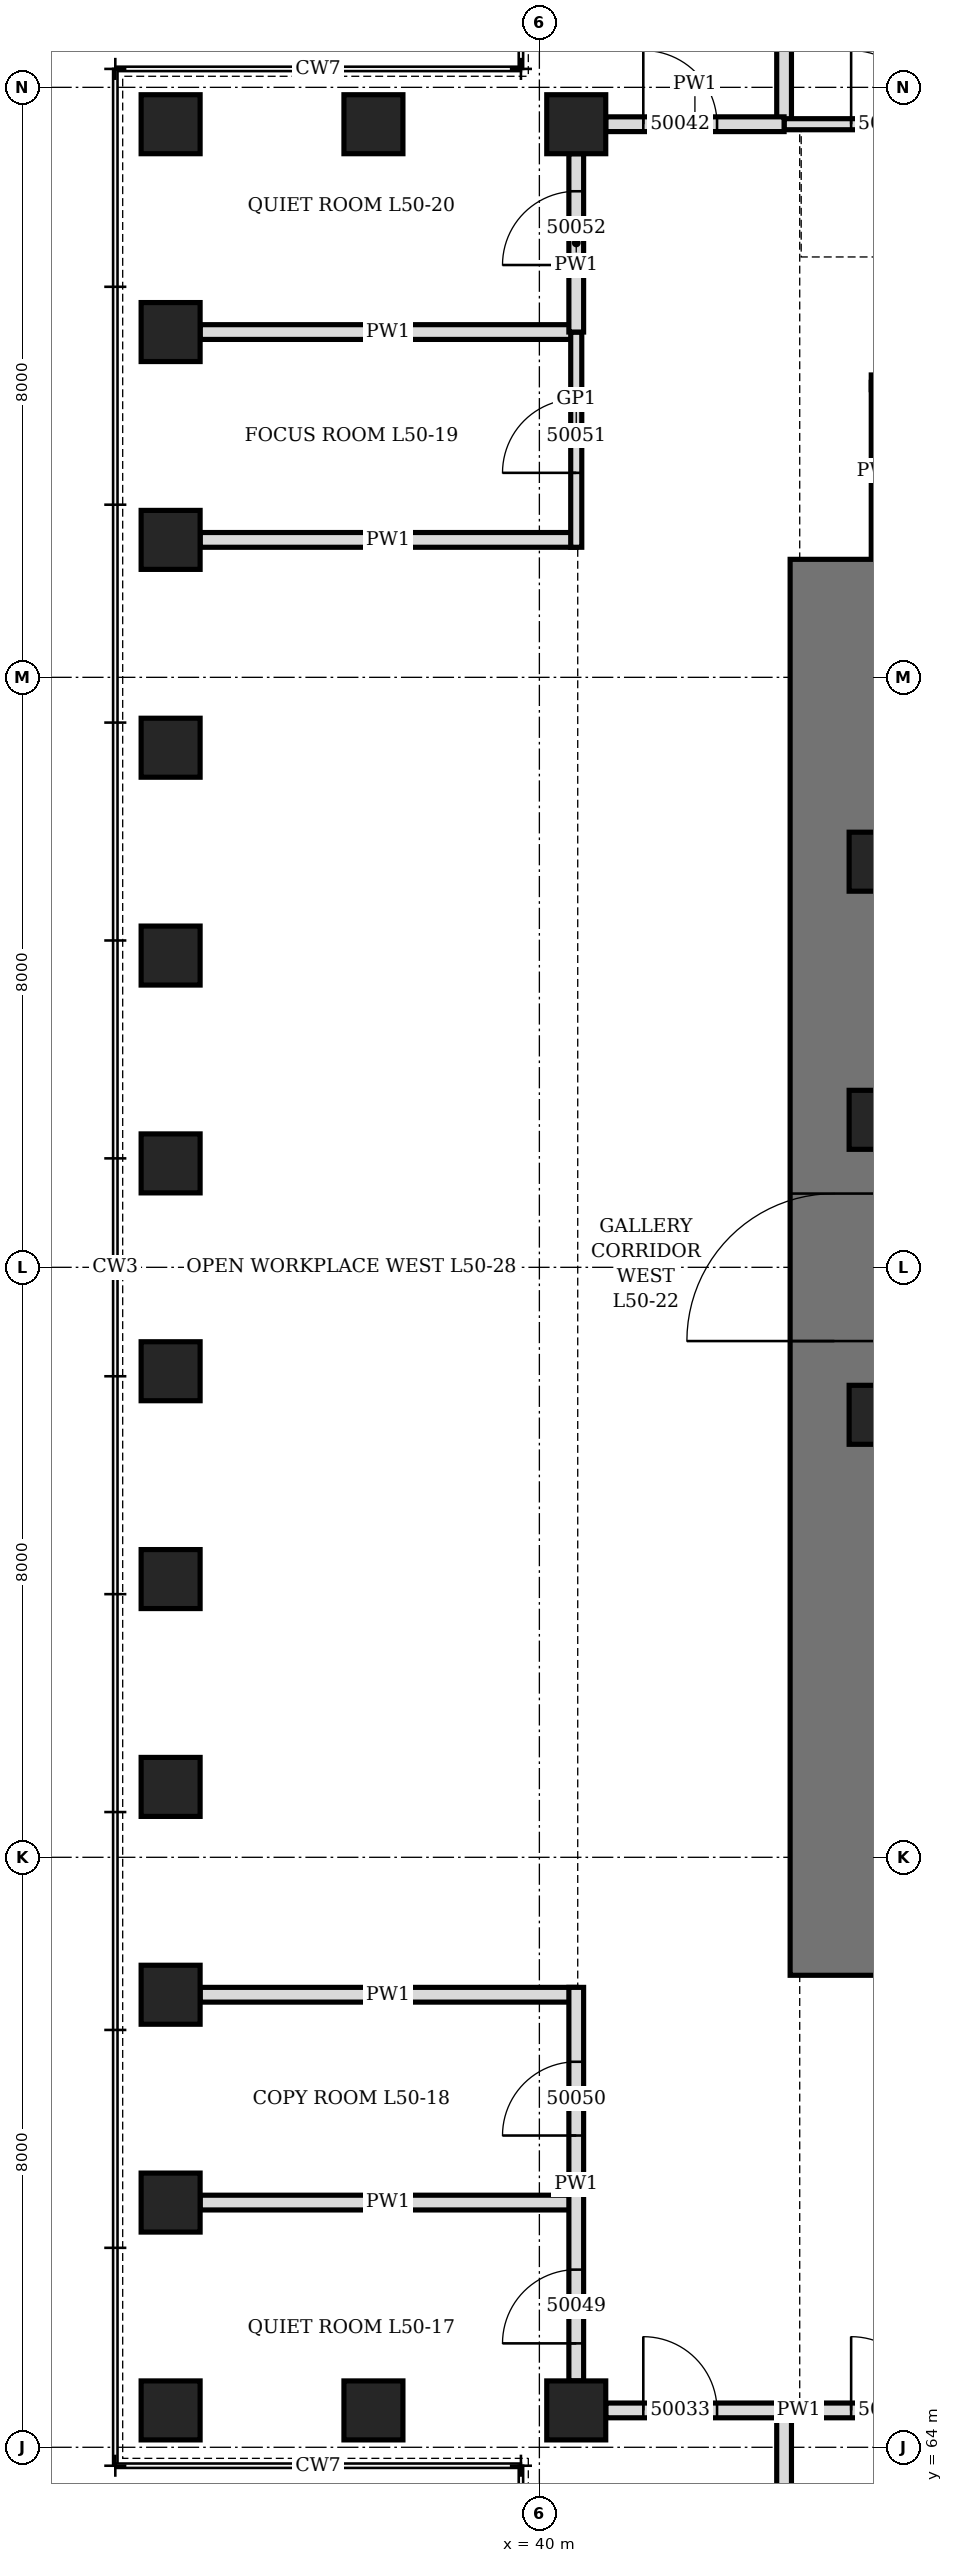
"""IFC4 building model, lengths in metres.
Left out: names, types, materials, properties, quantities, classifications, styles, units other than length and angle.
Written with IfcOpenShell. Run it as: python <this file> out.ifc"""

import sys

from ifc_helpers import new_model, si_unit, direction, frame, frame_2d, origin, origin_2d, place, context, subcontext, project, spatial, rectangle, hollow_rectangle, extrude, element, fill, save


model = new_model("IFC4")
c1 = context("Model", 3, precision=1e-05, world=origin(), true_north=direction((0.0, 1.0)))
c2 = subcontext(c1, "Body", "Model", "MODEL_VIEW")
j1 = project(units=[si_unit("LENGTHUNIT", "METRE"), si_unit("PLANEANGLEUNIT", "RADIAN")], contexts=[c1])
p1 = place(None, origin())
s1 = spatial("IfcSite", under=j1, at=p1, CompositionType="ELEMENT")
p2 = place(p1, origin())
s2 = spatial("IfcBuilding", under=s1, at=p2, CompositionType="ELEMENT")
p3 = place(p2, frame((0.0, 0.0, 223.3)))
s3 = spatial("IfcBuildingStorey", under=s2, at=p3, CompositionType="ELEMENT", Elevation=223.3)
for number, where, z_axis, x_axis in (
    (1, (40.5, 95.5, 0.0), (0.0, 0.0, 1.0), (1.0, 0.0, 0.0)),
    (2, (37.75, 95.5, 0.0), (0.0, 0.0, 1.0), (1.0, 0.0, 0.0)),
    (3, (35.0, 95.5, 0.0), (0.0, 0.0, 1.0), (0.0, 1.0, 0.0)),
    (4, (35.0, 92.682, 0.0), (0.0, 0.0, 1.0), (0.0, 1.0, 0.0)),
    (5, (35.0, 89.864, 0.0), (0.0, 0.0, 1.0), (0.0, 1.0, 0.0)),
    (6, (35.0, 87.045, 0.0), (0.0, 0.0, 1.0), (0.0, 1.0, 0.0)),
    (7, (35.0, 84.227, 0.0), (0.0, 0.0, 1.0), (0.0, 1.0, 0.0)),
    (8, (35.0, 81.409, 0.0), (0.0, 0.0, 1.0), (0.0, 1.0, 0.0)),
    (9, (35.0, 78.591, 0.0), (0.0, 0.0, 1.0), (0.0, 1.0, 0.0)),
    (10, (35.0, 75.773, 0.0), (0.0, 0.0, 1.0), (0.0, 1.0, 0.0)),
    (11, (35.0, 72.955, 0.0), (0.0, 0.0, 1.0), (0.0, 1.0, 0.0)),
    (12, (35.0, 70.136, 0.0), (0.0, 0.0, 1.0), (0.0, 1.0, 0.0)),
    (13, (35.0, 67.318, 0.0), (0.0, 0.0, 1.0), (0.0, 1.0, 0.0)),
    (14, (35.0, 64.5, 0.0), (0.0, 0.0, 1.0), (1.0, 0.0, 0.0)),
    (15, (37.75, 64.5, 0.0), (0.0, 0.0, 1.0), (1.0, 0.0, 0.0)),
    (16, (40.5, 64.5, 0.0), (0.0, 0.0, 1.0), (0.0, 1.0, 0.0)),
):
    element("IfcColumn", number, at=place(p3, frame(where, z_axis=z_axis, x_axis=x_axis)), inside=s3, PredefinedType="COLUMN", context=c2, shape_type="SweptSolid", body=[
        extrude(hollow_rectangle(XDim=0.8, YDim=0.8, WallThickness=0.08, at=origin_2d()), origin(), (0.0, 0.0, 1.0), 4.2),
    ])
p4 = place(p3, frame((44.0, 70.4, 0.0), z_axis=(0.0, 0.0, 1.0), x_axis=(0.0, 1.0, 0.0)))
e17 = element("IfcWall", 17, at=p4, inside=s3, PredefinedType="SHEAR", context=c2, shape_type="SweptSolid", body=[
    extrude(rectangle(XDim=19.2, YDim=1.2, at=frame_2d((9.6, 0.0))), origin(), (0.0, 0.0, 1.0), 4.2),
])
p5 = place(p4, frame((8.6, 0.0, 0.0)))
e18 = element("IfcOpeningElement", 18, at=p5, cuts=e17, PredefinedType="OPENING", context=c2, shape_type="SweptSolid", body=[
    extrude(rectangle(XDim=2.0, YDim=2.4, at=frame_2d((1.0, 1.2))), frame((0.0, 0.61, 0.0), z_axis=(0.0, -1.0, 0.0), x_axis=(1.0, 0.0, 0.0)), (0.0, 0.0, 1.0), 1.22),
])
for number, where, z_axis, x_axis in (
    (19, (44.6, 78.0, 0.0), (0.0, 0.0, 1.0), (1.0, 0.0, 0.0)),
    (20, (44.6, 82.0, 0.0), (0.0, 0.0, 1.0), (1.0, 0.0, 0.0)),
    (21, (44.6, 85.5, 0.0), (0.0, 0.0, 1.0), (1.0, 0.0, 0.0)),
):
    element("IfcColumn", number, at=place(p3, frame(where, z_axis=z_axis, x_axis=x_axis)), inside=s3, PredefinedType="COLUMN", context=c2, shape_type="SweptSolid", body=[
        extrude(hollow_rectangle(XDim=0.8, YDim=0.8, WallThickness=0.1, at=origin_2d()), origin(), (0.0, 0.0, 1.0), 4.2),
    ])
for number, where, z_axis, x_axis in (
    (22, (43.318, 59.4, 0.0), (0.0, 0.0, 1.0), (0.0, 1.0, 0.0)),
    (23, (43.318, 95.5, 0.0), (0.0, 0.0, 1.0), (0.0, 1.0, 0.0)),
    (24, (35.4, 67.318, 0.0), (0.0, 0.0, 1.0), (1.0, 0.0, 0.0)),
    (25, (35.4, 70.136, 0.0), (0.0, 0.0, 1.0), (1.0, 0.0, 0.0)),
    (26, (35.4, 89.864, 0.0), (0.0, 0.0, 1.0), (1.0, 0.0, 0.0)),
    (27, (35.4, 92.682, 0.0), (0.0, 0.0, 1.0), (1.0, 0.0, 0.0)),
):
    element("IfcWall", number, at=place(p3, frame(where, z_axis=z_axis, x_axis=x_axis)), inside=s3, PredefinedType="PARTITIONING", context=c2, shape_type="SweptSolid", body=[
        extrude(rectangle(XDim=5.1, YDim=0.2, at=frame_2d((2.55, 0.0))), origin(), (0.0, 0.0, 1.0), 3.428),
    ])
p6 = place(p3, frame((44.6, 89.6, 0.0), z_axis=(0.0, 0.0, 1.0), x_axis=(0.0, 1.0, 0.0)))
e28 = element("IfcWall", 28, at=p6, inside=s3, PredefinedType="PARTITIONING", context=c2, shape_type="SweptSolid", body=[
    extrude(rectangle(XDim=2.4, YDim=0.2, at=frame_2d((1.2, 0.0))), origin(), (0.0, 0.0, 1.0), 4.04),
])
p7 = place(p3, frame((40.9, 64.5, 0.0), z_axis=(0.0, 0.0, 1.0), x_axis=(1.0, 0.0, 0.0)))
e29 = element("IfcWall", 29, at=p7, inside=s3, PredefinedType="PARTITIONING", context=c2, shape_type="SweptSolid", body=[
    extrude(rectangle(XDim=5.237, YDim=0.2, at=frame_2d((2.618, 0.0))), origin(), (0.0, 0.0, 1.0), 4.04),
])
p8 = place(p7, frame((0.509, 0.0, 0.0)))
e30 = element("IfcOpeningElement", 30, at=p8, cuts=e29, PredefinedType="OPENING", context=c2, shape_type="SweptSolid", body=[
    extrude(rectangle(XDim=1.0, YDim=2.1, at=frame_2d((0.5, 1.05))), frame((0.0, 0.11, 0.0), z_axis=(0.0, -1.0, 0.0), x_axis=(1.0, 0.0, 0.0)), (0.0, 0.0, 1.0), 0.22),
])
p9 = place(p7, frame((3.327, 0.0, 0.0)))
e31 = element("IfcOpeningElement", 31, at=p9, cuts=e29, PredefinedType="OPENING", context=c2, shape_type="SweptSolid", body=[
    extrude(rectangle(XDim=1.0, YDim=2.1, at=frame_2d((0.5, 1.05))), frame((0.0, 0.11, 0.0), z_axis=(0.0, -1.0, 0.0), x_axis=(1.0, 0.0, 0.0)), (0.0, 0.0, 1.0), 0.22),
])
p10 = place(p3, frame((44.5, 92.0, 0.0), z_axis=(0.0, 0.0, 1.0), x_axis=(1.0, 0.0, 0.0)))
e32 = element("IfcWall", 32, at=p10, inside=s3, PredefinedType="PARTITIONING", context=c2, shape_type="SweptSolid", body=[
    extrude(rectangle(XDim=6.4, YDim=0.2, at=frame_2d((3.2, 0.0))), origin(), (0.0, 0.0, 1.0), 4.04),
])
p11 = place(p10, frame((2.7, 0.0, 0.0)))
e33 = element("IfcOpeningElement", 33, at=p11, cuts=e32, PredefinedType="OPENING", context=c2, shape_type="SweptSolid", body=[
    extrude(rectangle(XDim=1.0, YDim=2.1, at=frame_2d((0.5, 1.05))), frame((0.0, 0.11, 0.0), z_axis=(0.0, -1.0, 0.0), x_axis=(1.0, 0.0, 0.0)), (0.0, 0.0, 1.0), 0.22),
])
p12 = place(p3, frame((43.318, 95.5, 0.0), z_axis=(0.0, 0.0, 1.0), x_axis=(1.0, 0.0, 0.0)))
e34 = element("IfcWall", 34, at=p12, inside=s3, PredefinedType="PARTITIONING", context=c2, shape_type="SweptSolid", body=[
    extrude(rectangle(XDim=25.364, YDim=0.15, at=frame_2d((12.682, 0.0))), origin(), (0.0, 0.0, 1.0), 4.04),
])
p13 = place(p12, frame((0.909, 0.0, 0.0)))
e35 = element("IfcOpeningElement", 35, at=p13, cuts=e34, PredefinedType="OPENING", context=c2, shape_type="SweptSolid", body=[
    extrude(rectangle(XDim=1.0, YDim=2.4, at=frame_2d((0.5, 1.2))), frame((0.0, 0.085, 0.0), z_axis=(0.0, -1.0, 0.0), x_axis=(1.0, 0.0, 0.0)), (0.0, 0.0, 1.0), 0.17),
])
p14 = place(p12, frame((3.727, 0.0, 0.0)))
e36 = element("IfcOpeningElement", 36, at=p14, cuts=e34, PredefinedType="OPENING", context=c2, shape_type="SweptSolid", body=[
    extrude(rectangle(XDim=1.0, YDim=2.1, at=frame_2d((0.5, 1.05))), frame((0.0, 0.085, 0.0), z_axis=(0.0, -1.0, 0.0), x_axis=(1.0, 0.0, 0.0)), (0.0, 0.0, 1.0), 0.17),
])
p15 = place(p12, frame((9.364, 0.0, 0.0)))
e37 = element("IfcOpeningElement", 37, at=p15, cuts=e34, PredefinedType="OPENING", context=c2, shape_type="SweptSolid", body=[
    extrude(rectangle(XDim=1.0, YDim=2.1, at=frame_2d((0.5, 1.05))), frame((0.0, 0.085, 0.0), z_axis=(0.0, -1.0, 0.0), x_axis=(1.0, 0.0, 0.0)), (0.0, 0.0, 1.0), 0.17),
])
p16 = place(p12, frame((15.0, 0.0, 0.0)))
e38 = element("IfcOpeningElement", 38, at=p16, cuts=e34, PredefinedType="OPENING", context=c2, shape_type="SweptSolid", body=[
    extrude(rectangle(XDim=1.0, YDim=2.1, at=frame_2d((0.5, 1.05))), frame((0.0, 0.085, 0.0), z_axis=(0.0, -1.0, 0.0), x_axis=(1.0, 0.0, 0.0)), (0.0, 0.0, 1.0), 0.17),
])
p17 = place(p12, frame((20.636, 0.0, 0.0)))
e39 = element("IfcOpeningElement", 39, at=p17, cuts=e34, PredefinedType="OPENING", context=c2, shape_type="SweptSolid", body=[
    extrude(rectangle(XDim=1.0, YDim=2.1, at=frame_2d((0.5, 1.05))), frame((0.0, 0.085, 0.0), z_axis=(0.0, -1.0, 0.0), x_axis=(1.0, 0.0, 0.0)), (0.0, 0.0, 1.0), 0.17),
])
p18 = place(p3, frame((40.9, 95.5, 0.0), z_axis=(0.0, 0.0, 1.0), x_axis=(1.0, 0.0, 0.0)))
e40 = element("IfcWall", 40, at=p18, inside=s3, PredefinedType="PARTITIONING", context=c2, shape_type="SweptSolid", body=[
    extrude(rectangle(XDim=2.418, YDim=0.2, at=frame_2d((1.209, 0.0))), origin(), (0.0, 0.0, 1.0), 4.04),
])
p19 = place(p18, frame((0.509, 0.0, 0.0)))
e41 = element("IfcOpeningElement", 41, at=p19, cuts=e40, PredefinedType="OPENING", context=c2, shape_type="SweptSolid", body=[
    extrude(rectangle(XDim=1.0, YDim=2.1, at=frame_2d((0.5, 1.05))), frame((0.0, 0.11, 0.0), z_axis=(0.0, -1.0, 0.0), x_axis=(1.0, 0.0, 0.0)), (0.0, 0.0, 1.0), 0.22),
])
p20 = place(p3, frame((40.5, 89.764, 0.0), z_axis=(0.0, 0.0, 1.0), x_axis=(0.0, 1.0, 0.0)))
e42 = element("IfcWall", 42, at=p20, inside=s3, PredefinedType="PARTITIONING", context=c2, shape_type="SweptSolid", body=[
    extrude(rectangle(XDim=2.918, YDim=0.15, at=frame_2d((1.459, 0.0))), origin(), (0.0, 0.0, 1.0), 4.04),
])
p21 = place(p20, frame((1.009, 0.0, 0.0)))
e43 = element("IfcOpeningElement", 43, at=p21, cuts=e42, PredefinedType="OPENING", context=c2, shape_type="SweptSolid", body=[
    extrude(rectangle(XDim=1.0, YDim=2.4, at=frame_2d((0.5, 1.2))), frame((0.0, 0.085, 0.0), z_axis=(0.0, -1.0, 0.0), x_axis=(1.0, 0.0, 0.0)), (0.0, 0.0, 1.0), 0.17),
])
p22 = place(p3, frame((40.5, 64.9, 0.0), z_axis=(0.0, 0.0, 1.0), x_axis=(0.0, 1.0, 0.0)))
e44 = element("IfcWall", 44, at=p22, inside=s3, PredefinedType="PARTITIONING", context=c2, shape_type="SweptSolid", body=[
    extrude(rectangle(XDim=5.336, YDim=0.2, at=frame_2d((2.668, 0.0))), origin(), (0.0, 0.0, 1.0), 4.04),
])
p23 = place(p22, frame((0.509, 0.0, 0.0)))
e45 = element("IfcOpeningElement", 45, at=p23, cuts=e44, PredefinedType="OPENING", context=c2, shape_type="SweptSolid", body=[
    extrude(rectangle(XDim=1.0, YDim=2.1, at=frame_2d((0.5, 1.05))), frame((0.0, 0.11, 0.0), z_axis=(0.0, -1.0, 0.0), x_axis=(1.0, 0.0, 0.0)), (0.0, 0.0, 1.0), 0.22),
])
p24 = place(p22, frame((3.327, 0.0, 0.0)))
e46 = element("IfcOpeningElement", 46, at=p24, cuts=e44, PredefinedType="OPENING", context=c2, shape_type="SweptSolid", body=[
    extrude(rectangle(XDim=1.0, YDim=2.1, at=frame_2d((0.5, 1.05))), frame((0.0, 0.11, 0.0), z_axis=(0.0, -1.0, 0.0), x_axis=(1.0, 0.0, 0.0)), (0.0, 0.0, 1.0), 0.22),
])
p25 = place(p3, frame((40.5, 92.682, 0.0), z_axis=(0.0, 0.0, 1.0), x_axis=(0.0, 1.0, 0.0)))
e47 = element("IfcWall", 47, at=p25, inside=s3, PredefinedType="PARTITIONING", context=c2, shape_type="SweptSolid", body=[
    extrude(rectangle(XDim=2.418, YDim=0.2, at=frame_2d((1.209, 0.0))), origin(), (0.0, 0.0, 1.0), 4.04),
])
p26 = place(p25, frame((0.909, 0.0, 0.0)))
e48 = element("IfcOpeningElement", 48, at=p26, cuts=e47, PredefinedType="OPENING", context=c2, shape_type="SweptSolid", body=[
    extrude(rectangle(XDim=1.0, YDim=2.1, at=frame_2d((0.5, 1.05))), frame((0.0, 0.11, 0.0), z_axis=(0.0, -1.0, 0.0), x_axis=(1.0, 0.0, 0.0)), (0.0, 0.0, 1.0), 0.22),
])
p27 = place(p5, origin())
e49 = element("IfcDoor", 49, at=p27, inside=s3, OperationType="DOUBLE_DOOR_SINGLE_SWING", PredefinedType="DOOR", context=c2, shape_type="SweptSolid", body=[
    extrude(rectangle(XDim=2.0, YDim=2.4, at=frame_2d((1.0, 1.2))), frame((0.0, 0.35, 0.0), z_axis=(0.0, -1.0, 0.0), x_axis=(1.0, 0.0, 0.0)), (0.0, 0.0, 1.0), 0.7),
])
fill(e18, e49)
p28 = place(p8, origin())
e50 = element("IfcDoor", 50, at=p28, inside=s3, OperationType="SINGLE_SWING_LEFT", PredefinedType="DOOR", context=c2, shape_type="SweptSolid", body=[
    extrude(rectangle(XDim=1.0, YDim=2.1, at=frame_2d((0.5, 1.05))), frame((0.0, 0.1, 0.0), z_axis=(0.0, -1.0, 0.0), x_axis=(1.0, 0.0, 0.0)), (0.0, 0.0, 1.0), 0.199),
])
fill(e30, e50)
p29 = place(p9, origin())
e51 = element("IfcDoor", 51, at=p29, inside=s3, OperationType="SINGLE_SWING_LEFT", PredefinedType="DOOR", context=c2, shape_type="SweptSolid", body=[
    extrude(rectangle(XDim=1.0, YDim=2.1, at=frame_2d((0.5, 1.05))), frame((0.0, 0.1, 0.0), z_axis=(0.0, -1.0, 0.0), x_axis=(1.0, 0.0, 0.0)), (0.0, 0.0, 1.0), 0.199),
])
fill(e31, e51)
p30 = place(p19, origin())
e52 = element("IfcDoor", 52, at=p30, inside=s3, OperationType="SINGLE_SWING_LEFT", PredefinedType="DOOR", context=c2, shape_type="SweptSolid", body=[
    extrude(rectangle(XDim=1.0, YDim=2.1, at=frame_2d((0.5, 1.05))), frame((0.0, 0.1, 0.0), z_axis=(0.0, -1.0, 0.0), x_axis=(1.0, 0.0, 0.0)), (0.0, 0.0, 1.0), 0.199),
])
fill(e41, e52)
p31 = place(p13, origin())
e53 = element("IfcDoor", 53, at=p31, inside=s3, OperationType="SINGLE_SWING_RIGHT", PredefinedType="DOOR", context=c2, shape_type="SweptSolid", body=[
    extrude(rectangle(XDim=1.0, YDim=2.4, at=frame_2d((0.5, 1.2))), frame((0.0, 0.075, 0.0), z_axis=(0.0, -1.0, 0.0), x_axis=(1.0, 0.0, 0.0)), (0.0, 0.0, 1.0), 0.149),
])
fill(e35, e53)
p32 = place(p23, origin())
e54 = element("IfcDoor", 54, at=p32, inside=s3, OperationType="SINGLE_SWING_LEFT", PredefinedType="DOOR", context=c2, shape_type="SweptSolid", body=[
    extrude(rectangle(XDim=1.0, YDim=2.1, at=frame_2d((0.5, 1.05))), frame((0.0, 0.1, 0.0), z_axis=(0.0, -1.0, 0.0), x_axis=(1.0, 0.0, 0.0)), (0.0, 0.0, 1.0), 0.199),
])
fill(e45, e54)
p33 = place(p24, origin())
e55 = element("IfcDoor", 55, at=p33, inside=s3, OperationType="SINGLE_SWING_LEFT", PredefinedType="DOOR", context=c2, shape_type="SweptSolid", body=[
    extrude(rectangle(XDim=1.0, YDim=2.1, at=frame_2d((0.5, 1.05))), frame((0.0, 0.1, 0.0), z_axis=(0.0, -1.0, 0.0), x_axis=(1.0, 0.0, 0.0)), (0.0, 0.0, 1.0), 0.199),
])
fill(e46, e55)
p34 = place(p21, origin())
e56 = element("IfcDoor", 56, at=p34, inside=s3, OperationType="SINGLE_SWING_RIGHT", PredefinedType="DOOR", context=c2, shape_type="SweptSolid", body=[
    extrude(rectangle(XDim=1.0, YDim=2.4, at=frame_2d((0.5, 1.2))), frame((0.0, 0.075, 0.0), z_axis=(0.0, -1.0, 0.0), x_axis=(1.0, 0.0, 0.0)), (0.0, 0.0, 1.0), 0.149),
])
fill(e43, e56)
p35 = place(p26, origin())
e57 = element("IfcDoor", 57, at=p35, inside=s3, OperationType="SINGLE_SWING_LEFT", PredefinedType="DOOR", context=c2, shape_type="SweptSolid", body=[
    extrude(rectangle(XDim=1.0, YDim=2.1, at=frame_2d((0.5, 1.05))), frame((0.0, 0.1, 0.0), z_axis=(0.0, -1.0, 0.0), x_axis=(1.0, 0.0, 0.0)), (0.0, 0.0, 1.0), 0.199),
])
fill(e48, e57)
save(model, sys.argv[1])
